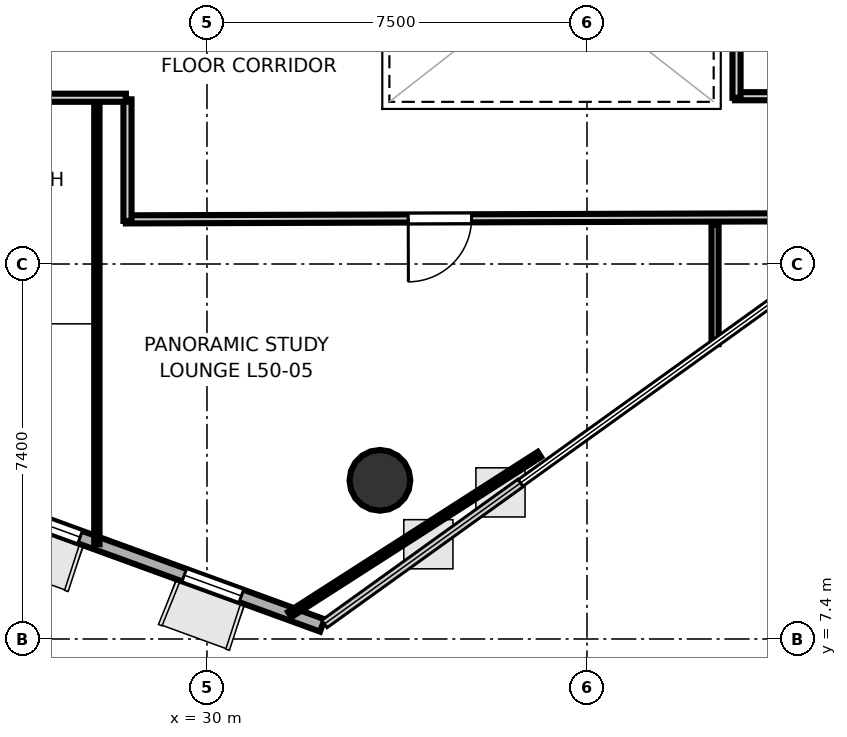
"""IFC4 building model, lengths in metres.
Left out: names, types, materials, properties, quantities, classifications, styles, units other than length and angle.
Written with IfcOpenShell. Run it as: python <this file> out.ifc"""

import sys

from ifc_helpers import new_model, si_unit, direction, frame, frame_2d, origin, origin_2d, place, context, subcontext, project, spatial, rectangle, hollow_circle, extrude, element, fill, save


model = new_model("IFC4")
c1 = context("Model", 3, precision=1e-05, world=origin(), true_north=direction((0.0, 1.0)))
c2 = subcontext(c1, "Body", "Model", "MODEL_VIEW")
j1 = project(units=[si_unit("LENGTHUNIT", "METRE"), si_unit("PLANEANGLEUNIT", "RADIAN")], contexts=[c1])
p1 = place(None, origin())
s1 = spatial("IfcSite", under=j1, at=p1, CompositionType="ELEMENT")
p2 = place(p1, origin())
s2 = spatial("IfcBuilding", under=s1, at=p2, CompositionType="ELEMENT")
p3 = place(p2, frame((0.0, 0.0, 196.6)))
s3 = spatial("IfcBuildingStorey", under=s2, at=p3, CompositionType="ELEMENT", Elevation=196.6)
p4 = place(p3, frame((33.413, 10.531, 0.0), z_axis=(0.0, 0.0, 1.0), x_axis=(1.0, 0.0, 0.0)))
e1 = element("IfcColumn", 1, at=p4, inside=s3, PredefinedType="COLUMN", context=c2, shape_type="SweptSolid", body=[
    extrude(hollow_circle(Radius=0.6, WallThickness=0.03, at=origin_2d()), origin(), (0.0, 0.0, 1.0), 3.7),
])
p5 = place(p3, frame((25.072, 10.293, 0.0), z_axis=(0.0, 0.0, 1.0), x_axis=(0.939543106306, -0.342430651948, 0.0)))
e2 = element("IfcWall", 2, at=p5, inside=s3, PredefinedType="SOLIDWALL", context=c2, shape_type="SweptSolid", body=[
    extrude(rectangle(XDim=7.668, YDim=0.26, at=frame_2d((3.834, 0.0))), origin(), (0.0, 0.0, 1.0), 3.52),
])
p6 = place(p5, frame((1.38, 0.0, 0.9)))
e3 = element("IfcOpeningElement", 3, at=p6, cuts=e2, PredefinedType="OPENING", context=c2, shape_type="SweptSolid", body=[
    extrude(rectangle(XDim=1.2, YDim=2.0, at=frame_2d((0.6, 1.0))), frame((0.0, 0.14, 0.0), z_axis=(0.0, -1.0, 0.0), x_axis=(1.0, 0.0, 0.0)), (0.0, 0.0, 1.0), 0.28),
])
p7 = place(p5, frame((4.768, 0.0, 0.9)))
e4 = element("IfcOpeningElement", 4, at=p7, cuts=e2, PredefinedType="OPENING", context=c2, shape_type="SweptSolid", body=[
    extrude(rectangle(XDim=1.2, YDim=2.0, at=frame_2d((0.6, 1.0))), frame((0.0, 0.14, 0.0), z_axis=(0.0, -1.0, 0.0), x_axis=(1.0, 0.0, 0.0)), (0.0, 0.0, 1.0), 0.28),
])
p8 = place(p3, frame((43.15, 18.111, 0.0), z_axis=(0.0, 0.0, 1.0), x_axis=(-1.0, 0.0, 0.0)))
e5 = element("IfcWall", 5, at=p8, inside=s3, PredefinedType="PARTITIONING", context=c2, shape_type="SweptSolid", body=[
    extrude(rectangle(XDim=2.73, YDim=0.16, at=frame_2d((1.365, 0.0))), origin(), (0.0, 0.0, 1.0), 2.84),
])
p9 = place(p8, frame((0.765, 0.0, 0.0)))
e6 = element("IfcOpeningElement", 6, at=p9, cuts=e5, PredefinedType="OPENING", context=c2, shape_type="SweptSolid", body=[
    extrude(rectangle(XDim=1.2, YDim=2.15, at=frame_2d((0.6, 1.075))), frame((0.0, 0.09, 0.0), z_axis=(0.0, -1.0, 0.0), x_axis=(1.0, 0.0, 0.0)), (0.0, 0.0, 1.0), 0.18),
])
p10 = place(p3, frame((40.451, 18.08, 0.0), z_axis=(0.0, 0.0, 1.0), x_axis=(0.0, 1.0, 0.0)))
e7 = element("IfcWall", 7, at=p10, inside=s3, PredefinedType="PARTITIONING", context=c2, shape_type="SweptSolid", body=[
    extrude(rectangle(XDim=3.32, YDim=0.16, at=frame_2d((1.66, 0.0))), origin(), (0.0, 0.0, 1.0), 2.84),
])
p11 = place(p3, frame((43.508, 15.727, 0.0), z_axis=(0.0, 0.0, 1.0), x_axis=(-0.999995335964, -0.003054185684, 0.0)))
e8 = element("IfcWall", 8, at=p11, inside=s3, PredefinedType="PARTITIONING", context=c2, shape_type="SweptSolid", body=[
    extrude(rectangle(XDim=15.108, YDim=0.16, at=frame_2d((7.554, 0.0))), origin(), (0.0, 0.0, 1.0), 2.84),
])
p12 = place(p11, frame((8.287, 0.0, 0.0)))
e9 = element("IfcOpeningElement", 9, at=p12, cuts=e8, PredefinedType="OPENING", context=c2, shape_type="SweptSolid", body=[
    extrude(rectangle(XDim=1.25, YDim=2.2, at=frame_2d((0.625, 1.1))), frame((0.0, 0.09, 0.0), z_axis=(0.0, -1.0, 0.0), x_axis=(1.0, 0.0, 0.0)), (0.0, 0.0, 1.0), 0.18),
])
p13 = place(p3, frame((28.431, 15.65, 0.0), z_axis=(0.0, 0.0, 1.0), x_axis=(0.0, 1.0, 0.0)))
e10 = element("IfcWall", 10, at=p13, inside=s3, PredefinedType="PARTITIONING", context=c2, shape_type="SweptSolid", body=[
    extrude(rectangle(XDim=2.4, YDim=0.16, at=frame_2d((1.2, 0.0))), origin(), (0.0, 0.0, 1.0), 2.84),
])
p14 = place(p3, frame((28.4, 18.081, 0.0), z_axis=(0.0, 0.0, 1.0), x_axis=(-1.0, 0.0, 0.0)))
e11 = element("IfcWall", 11, at=p14, inside=s3, PredefinedType="PARTITIONING", context=c2, shape_type="SweptSolid", body=[
    extrude(rectangle(XDim=2.95, YDim=0.16, at=frame_2d((1.475, 0.0))), origin(), (0.0, 0.0, 1.0), 2.84),
])
p15 = place(p3, frame((27.827, 17.97, 0.0), z_axis=(0.0, 0.0, 1.0), x_axis=(0.0, -1.0, 0.0)))
e12 = element("IfcWall", 12, at=p15, inside=s3, PredefinedType="PARTITIONING", context=c2, shape_type="SweptSolid", body=[
    extrude(rectangle(XDim=8.701, YDim=0.105, at=frame_2d((4.351, 0.0))), origin(), (0.0, 0.0, 1.0), 2.84),
])
p16 = place(p3, frame((40.027, 15.57, 0.0), z_axis=(0.0, 0.0, 1.0), x_axis=(0.0, -1.0, 0.0)))
e13 = element("IfcWall", 13, at=p16, inside=s3, PredefinedType="PARTITIONING", context=c2, shape_type="SweptSolid", body=[
    extrude(rectangle(XDim=2.351, YDim=0.14, at=frame_2d((1.176, 0.0))), origin(), (0.0, 0.0, 1.0), 2.84),
])
p17 = place(p3, frame((36.56, 11.042, 0.0), z_axis=(0.0, 0.0, 1.0), x_axis=(-0.841833935687, -0.539736625333, 0.0)))
e14 = element("IfcWall", 14, at=p17, inside=s3, PredefinedType="PARTITIONING", context=c2, shape_type="SweptSolid", body=[
    extrude(rectangle(XDim=5.852, YDim=0.12, at=frame_2d((2.926, 0.0))), origin(), (0.0, 0.0, 1.0), 2.84),
])
p18 = place(p12, origin())
e15 = element("IfcDoor", 15, at=p18, inside=s3, OperationType="SINGLE_SWING_RIGHT", PredefinedType="DOOR", context=c2, shape_type="SweptSolid", body=[
    extrude(rectangle(XDim=1.25, YDim=2.2, at=frame_2d((0.625, 1.1))), frame((0.0, 0.025, 0.0), z_axis=(0.0, -1.0, 0.0), x_axis=(1.0, 0.0, 0.0)), (0.0, 0.0, 1.0), 0.05),
])
fill(e9, e15)
p19 = place(p6, origin())
e16 = element("IfcWindow", 16, at=p19, inside=s3, PartitioningType="SINGLE_PANEL", PredefinedType="WINDOW", context=c2, shape_type="SweptSolid", body=[
    extrude(rectangle(XDim=1.2, YDim=2.0, at=frame_2d((0.6, 1.0))), frame((0.0, 0.03, 0.0), z_axis=(0.0, -1.0, 0.0), x_axis=(1.0, 0.0, 0.0)), (0.0, 0.0, 1.0), 0.06),
])
fill(e3, e16)
p20 = place(p7, origin())
e17 = element("IfcWindow", 17, at=p20, inside=s3, PartitioningType="SINGLE_PANEL", PredefinedType="WINDOW", context=c2, shape_type="SweptSolid", body=[
    extrude(rectangle(XDim=1.2, YDim=2.0, at=frame_2d((0.6, 1.0))), frame((0.0, 0.03, 0.0), z_axis=(0.0, -1.0, 0.0), x_axis=(1.0, 0.0, 0.0)), (0.0, 0.0, 1.0), 0.06),
])
fill(e4, e17)
save(model, sys.argv[1])
